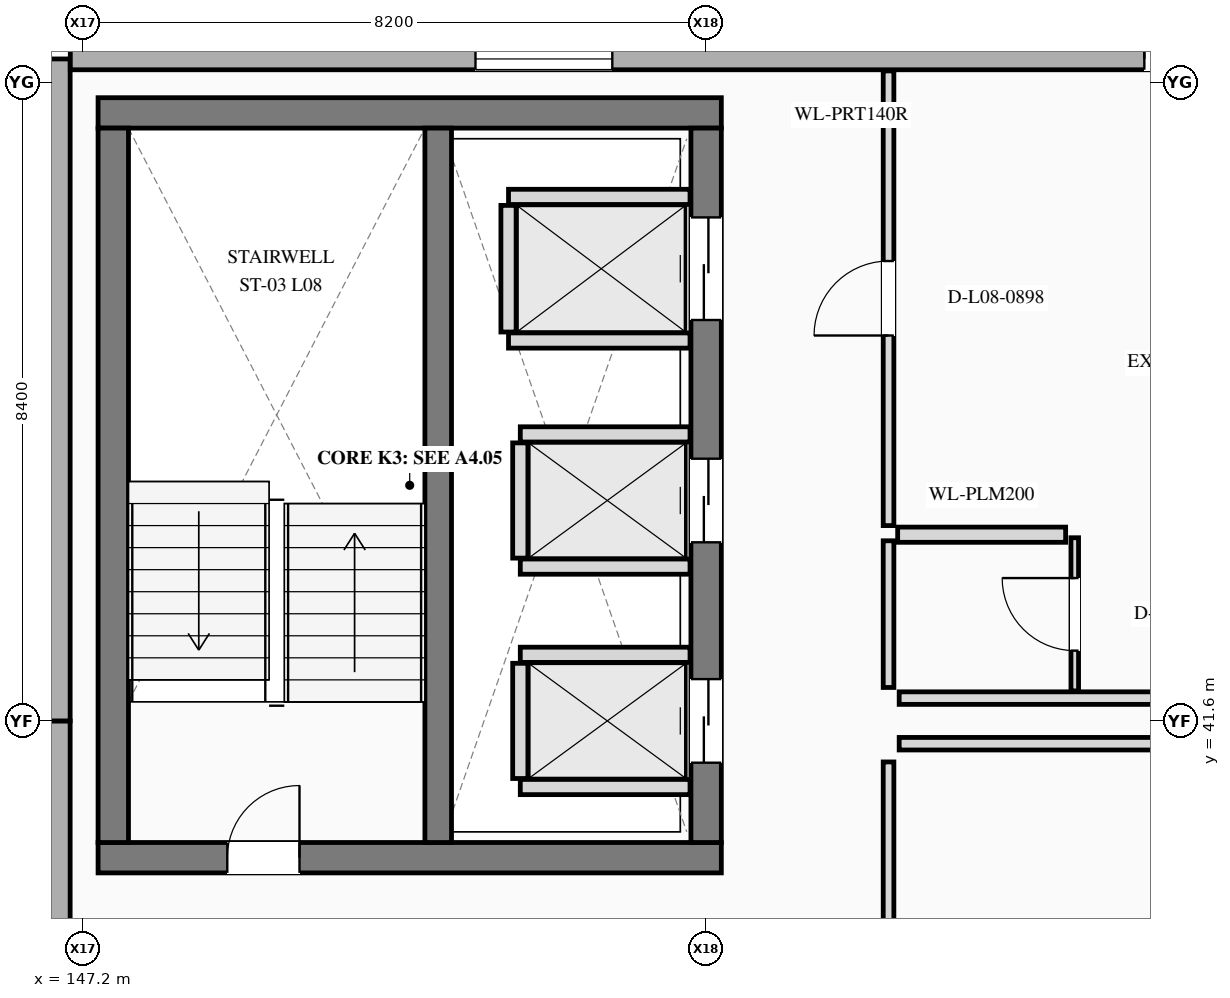
"""IFC4 building model, lengths in metres.
Left out: names, types, materials, properties, quantities, classifications, styles, units other than length and angle.
Written with IfcOpenShell. Run it as: python <this file> out.ifc"""

import sys

from ifc_helpers import new_model, si_unit, direction, frame, frame_2d, origin, place, context, subcontext, project, spatial, rectangle, extrude, element, fill, save


model = new_model("IFC4")
c1 = context("Model", 3, precision=1e-05, world=origin(), true_north=direction((0.0, 1.0)))
c2 = subcontext(c1, "Body", "Model", "MODEL_VIEW")
j1 = project(units=[si_unit("LENGTHUNIT", "METRE"), si_unit("PLANEANGLEUNIT", "RADIAN")], contexts=[c1])
p1 = place(None, origin())
s1 = spatial("IfcSite", under=j1, at=p1, CompositionType="ELEMENT")
p2 = place(p1, origin())
s2 = spatial("IfcBuilding", under=s1, at=p2, CompositionType="ELEMENT")
p3 = place(p2, frame((0.0, 0.0, 34.1)))
s3 = spatial("IfcBuildingStorey", under=s2, at=p3, CompositionType="ELEMENT", Elevation=34.1)
p4 = place(p3, frame((146.89, 33.2, 0.0), z_axis=(0.0, 0.0, 1.0), x_axis=(0.0, 1.0, 0.0)))
e1 = element("IfcWall", 1, at=p4, inside=s3, PredefinedType="STANDARD", context=c2, shape_type="SweptSolid", body=[
    extrude(rectangle(XDim=8.4, YDim=0.285, at=frame_2d((4.2, 0.0))), origin(), (0.0, 0.0, 1.0), 3.5),
])
p5 = place(p3, frame((146.89, 41.6, 0.0), z_axis=(0.0, 0.0, 1.0), x_axis=(0.0, 1.0, 0.0)))
e2 = element("IfcWall", 2, at=p5, inside=s3, PredefinedType="STANDARD", context=c2, shape_type="SweptSolid", body=[
    extrude(rectangle(XDim=8.71, YDim=0.285, at=frame_2d((4.355, 0.0))), origin(), (0.0, 0.0, 1.0), 3.5),
])
p6 = place(p3, frame((166.166, 50.31, 0.0), z_axis=(0.0, 0.0, 1.0), x_axis=(-1.0, 0.0, 0.0)))
e3 = element("IfcWall", 3, at=p6, inside=s3, PredefinedType="STANDARD", context=c2, shape_type="SweptSolid", body=[
    extrude(rectangle(XDim=19.131, YDim=0.285, at=frame_2d((9.565, 0.0))), origin(), (0.0, 0.0, 1.0), 3.5),
])
p7 = place(p6, frame((3.2, 0.0, 0.0)))
e4 = element("IfcOpeningElement", 4, at=p7, cuts=e3, PredefinedType="OPENING", context=c2, shape_type="SweptSolid", body=[
    extrude(rectangle(XDim=1.8, YDim=2.3, at=frame_2d((0.9, 1.15))), frame((0.0, 0.152, 0.0), z_axis=(0.0, -1.0, 0.0), x_axis=(1.0, 0.0, 0.0)), (0.0, 0.0, 1.0), 0.305),
])
p8 = place(p6, frame((12.0, 0.0, 0.88)))
e5 = element("IfcOpeningElement", 5, at=p8, cuts=e3, PredefinedType="OPENING", context=c2, shape_type="SweptSolid", body=[
    extrude(rectangle(XDim=1.8, YDim=1.8, at=frame_2d((0.9, 0.9))), frame((0.0, 0.152, 0.0), z_axis=(0.0, -1.0, 0.0), x_axis=(1.0, 0.0, 0.0)), (0.0, 0.0, 1.0), 0.305),
])
p9 = place(p3, frame((147.4, 39.8, 0.0), z_axis=(0.0, 0.0, 1.0), x_axis=(1.0, 0.0, 0.0)))
e6 = element("IfcWall", 6, at=p9, inside=s3, PredefinedType="SHEAR", context=c2, shape_type="SweptSolid", body=[
    extrude(rectangle(XDim=8.2, YDim=0.4, at=frame_2d((4.1, 0.0))), origin(), (0.0, 0.0, 1.0), 3.5),
])
p10 = place(p9, frame((1.7, 0.0, 0.0)))
e7 = element("IfcOpeningElement", 7, at=p10, cuts=e6, PredefinedType="OPENING", context=c2, shape_type="SweptSolid", body=[
    extrude(rectangle(XDim=0.95, YDim=2.2, at=frame_2d((0.475, 1.1))), frame((0.0, 0.21, 0.0), z_axis=(0.0, -1.0, 0.0), x_axis=(1.0, 0.0, 0.0)), (0.0, 0.0, 1.0), 0.42),
])
p11 = place(p3, frame((155.6, 49.6, 0.0), z_axis=(0.0, 0.0, 1.0), x_axis=(-1.0, 0.0, 0.0)))
e8 = element("IfcWall", 8, at=p11, inside=s3, PredefinedType="SHEAR", context=c2, shape_type="SweptSolid", body=[
    extrude(rectangle(XDim=8.2, YDim=0.4, at=frame_2d((4.1, 0.0))), origin(), (0.0, 0.0, 1.0), 3.5),
])
p12 = place(p3, frame((147.6, 49.4, 0.0), z_axis=(0.0, 0.0, 1.0), x_axis=(0.0, -1.0, 0.0)))
e9 = element("IfcWall", 9, at=p12, inside=s3, PredefinedType="SHEAR", context=c2, shape_type="SweptSolid", body=[
    extrude(rectangle(XDim=9.4, YDim=0.4, at=frame_2d((4.7, 0.0))), origin(), (0.0, 0.0, 1.0), 3.5),
])
p13 = place(p3, frame((155.4, 40.0, 0.0), z_axis=(0.0, 0.0, 1.0), x_axis=(0.0, 1.0, 0.0)))
e10 = element("IfcWall", 10, at=p13, inside=s3, PredefinedType="SHEAR", context=c2, shape_type="SweptSolid", body=[
    extrude(rectangle(XDim=9.4, YDim=0.4, at=frame_2d((4.7, 0.0))), origin(), (0.0, 0.0, 1.0), 3.5),
])
p14 = place(p13, frame((1.05, 0.0, 0.0)))
e11 = element("IfcOpeningElement", 11, at=p14, cuts=e10, PredefinedType="OPENING", context=c2, shape_type="SweptSolid", body=[
    extrude(rectangle(XDim=1.1, YDim=2.2, at=frame_2d((0.55, 1.1))), frame((0.0, 0.21, 0.0), z_axis=(0.0, -1.0, 0.0), x_axis=(1.0, 0.0, 0.0)), (0.0, 0.0, 1.0), 0.42),
])
p15 = place(p13, frame((3.95, 0.0, 0.0)))
e12 = element("IfcOpeningElement", 12, at=p15, cuts=e10, PredefinedType="OPENING", context=c2, shape_type="SweptSolid", body=[
    extrude(rectangle(XDim=1.1, YDim=2.2, at=frame_2d((0.55, 1.1))), frame((0.0, 0.21, 0.0), z_axis=(0.0, -1.0, 0.0), x_axis=(1.0, 0.0, 0.0)), (0.0, 0.0, 1.0), 0.42),
])
p16 = place(p13, frame((6.875, 0.0, 0.0)))
e13 = element("IfcOpeningElement", 13, at=p16, cuts=e10, PredefinedType="OPENING", context=c2, shape_type="SweptSolid", body=[
    extrude(rectangle(XDim=1.35, YDim=2.3, at=frame_2d((0.675, 1.15))), frame((0.0, 0.21, 0.0), z_axis=(0.0, -1.0, 0.0), x_axis=(1.0, 0.0, 0.0)), (0.0, 0.0, 1.0), 0.42),
])
p17 = place(p3, frame((151.875, 40.0, 0.0), z_axis=(0.0, 0.0, 1.0), x_axis=(0.0, 1.0, 0.0)))
e14 = element("IfcWall", 14, at=p17, inside=s3, PredefinedType="SHEAR", context=c2, shape_type="SweptSolid", body=[
    extrude(rectangle(XDim=9.4, YDim=0.35, at=frame_2d((4.7, 0.0))), origin(), (0.0, 0.0, 1.0), 3.5),
])
for number, where, z_axis, x_axis in (
    (15, (152.955, 40.73, 0.0), (0.0, 0.0, 1.0), (1.0, 0.0, 0.0)),
    (16, (152.955, 42.47, 0.0), (0.0, 0.0, 1.0), (1.0, 0.0, 0.0)),
):
    element("IfcWall", number, at=place(p3, frame(where, z_axis=z_axis, x_axis=x_axis)), inside=s3, PredefinedType="PLUMBINGWALL", context=c2, shape_type="SweptSolid", body=[
        extrude(rectangle(XDim=2.233, YDim=0.2, at=frame_2d((1.116, 0.0))), origin(), (0.0, 0.0, 1.0), 3.19),
    ])
p18 = place(p3, frame((152.955, 40.842, 0.0), z_axis=(0.0, 0.0, 1.0), x_axis=(0.0, 1.0, 0.0)))
e17 = element("IfcWall", 17, at=p18, inside=s3, PredefinedType="PLUMBINGWALL", context=c2, shape_type="SweptSolid", body=[
    extrude(rectangle(XDim=1.516, YDim=0.2, at=frame_2d((0.758, 0.0))), origin(), (0.0, 0.0, 1.0), 3.19),
])
for number, where, z_axis, x_axis in (
    (18, (152.955, 43.63, 0.0), (0.0, 0.0, 1.0), (1.0, 0.0, 0.0)),
    (19, (152.955, 45.37, 0.0), (0.0, 0.0, 1.0), (1.0, 0.0, 0.0)),
):
    element("IfcWall", number, at=place(p3, frame(where, z_axis=z_axis, x_axis=x_axis)), inside=s3, PredefinedType="PLUMBINGWALL", context=c2, shape_type="SweptSolid", body=[
        extrude(rectangle(XDim=2.233, YDim=0.2, at=frame_2d((1.116, 0.0))), origin(), (0.0, 0.0, 1.0), 3.19),
    ])
p19 = place(p3, frame((152.955, 43.742, 0.0), z_axis=(0.0, 0.0, 1.0), x_axis=(0.0, 1.0, 0.0)))
e20 = element("IfcWall", 20, at=p19, inside=s3, PredefinedType="PLUMBINGWALL", context=c2, shape_type="SweptSolid", body=[
    extrude(rectangle(XDim=1.516, YDim=0.2, at=frame_2d((0.758, 0.0))), origin(), (0.0, 0.0, 1.0), 3.19),
])
for number, where, z_axis, x_axis in (
    (21, (152.8, 46.605, 0.0), (0.0, 0.0, 1.0), (1.0, 0.0, 0.0)),
    (22, (152.8, 48.495, 0.0), (0.0, 0.0, 1.0), (1.0, 0.0, 0.0)),
):
    element("IfcWall", number, at=place(p3, frame(where, z_axis=z_axis, x_axis=x_axis)), inside=s3, PredefinedType="PLUMBINGWALL", context=c2, shape_type="SweptSolid", body=[
        extrude(rectangle(XDim=2.388, YDim=0.2, at=frame_2d((1.194, 0.0))), origin(), (0.0, 0.0, 1.0), 3.19),
    ])
p20 = place(p3, frame((152.8, 46.717, 0.0), z_axis=(0.0, 0.0, 1.0), x_axis=(0.0, 1.0, 0.0)))
e23 = element("IfcWall", 23, at=p20, inside=s3, PredefinedType="PLUMBINGWALL", context=c2, shape_type="SweptSolid", body=[
    extrude(rectangle(XDim=1.666, YDim=0.2, at=frame_2d((0.833, 0.0))), origin(), (0.0, 0.0, 1.0), 3.19),
])
p21 = place(p3, frame((157.8, 35.77, 0.0), z_axis=(0.0, 0.0, 1.0), x_axis=(0.0, 1.0, 0.0)))
e24 = element("IfcWall", 24, at=p21, inside=s3, PredefinedType="PARTITIONING", context=c2, shape_type="SweptSolid", body=[
    extrude(rectangle(XDim=5.29, YDim=0.14, at=frame_2d((2.645, 0.0))), origin(), (0.0, 0.0, 1.0), 3.19),
])
p22 = place(p21, frame((2.185, 0.0, 0.0)))
e25 = element("IfcOpeningElement", 25, at=p22, cuts=e24, PredefinedType="OPENING", context=c2, shape_type="SweptSolid", body=[
    extrude(rectangle(XDim=0.92, YDim=2.15, at=frame_2d((0.46, 1.075))), frame((0.0, 0.08, 0.0), z_axis=(0.0, -1.0, 0.0), x_axis=(1.0, 0.0, 0.0)), (0.0, 0.0, 1.0), 0.16),
])
p23 = place(p3, frame((157.94, 41.3, 0.0), z_axis=(0.0, 0.0, 1.0), x_axis=(1.0, 0.0, 0.0)))
e26 = element("IfcWall", 26, at=p23, inside=s3, PredefinedType="PARTITIONING", context=c2, shape_type="SweptSolid", body=[
    extrude(rectangle(XDim=8.213, YDim=0.165, at=frame_2d((4.106, 0.0))), origin(), (0.0, 0.0, 1.0), 2.58),
])
p24 = place(p3, frame((157.8, 42.04, 0.0), z_axis=(0.0, 0.0, 1.0), x_axis=(0.0, 1.0, 0.0)))
e27 = element("IfcWall", 27, at=p24, inside=s3, PredefinedType="PARTITIONING", context=c2, shape_type="SweptSolid", body=[
    extrude(rectangle(XDim=1.93, YDim=0.14, at=frame_2d((0.965, 0.0))), origin(), (0.0, 0.0, 1.0), 2.743),
])
p25 = place(p3, frame((157.8, 44.17, 0.0), z_axis=(0.0, 0.0, 1.0), x_axis=(0.0, 1.0, 0.0)))
e28 = element("IfcWall", 28, at=p25, inside=s3, PredefinedType="PARTITIONING", context=c2, shape_type="SweptSolid", body=[
    extrude(rectangle(XDim=5.983, YDim=0.14, at=frame_2d((2.991, 0.0))), origin(), (0.0, 0.0, 1.0), 2.743),
])
p26 = place(p25, frame((2.501, 0.0, 0.0)))
e29 = element("IfcOpeningElement", 29, at=p26, cuts=e28, PredefinedType="OPENING", context=c2, shape_type="SweptSolid", body=[
    extrude(rectangle(XDim=0.98, YDim=2.2, at=frame_2d((0.49, 1.1))), frame((0.0, 0.08, 0.0), z_axis=(0.0, -1.0, 0.0), x_axis=(1.0, 0.0, 0.0)), (0.0, 0.0, 1.0), 0.16),
])
p27 = place(p3, frame((157.94, 41.9, 0.0), z_axis=(0.0, 0.0, 1.0), x_axis=(1.0, 0.0, 0.0)))
e30 = element("IfcWall", 30, at=p27, inside=s3, PredefinedType="PARTITIONING", context=c2, shape_type="SweptSolid", body=[
    extrude(rectangle(XDim=8.213, YDim=0.165, at=frame_2d((4.106, 0.0))), origin(), (0.0, 0.0, 1.0), 2.58),
])
p28 = place(p3, frame((157.92, 44.05, 0.0), z_axis=(0.0, 0.0, 1.0), x_axis=(1.0, 0.0, 0.0)))
e31 = element("IfcWall", 31, at=p28, inside=s3, PredefinedType="PLUMBINGWALL", context=c2, shape_type="SweptSolid", body=[
    extrude(rectangle(XDim=2.21, YDim=0.2, at=frame_2d((1.105, 0.0))), origin(), (0.0, 0.0, 1.0), 3.19),
])
p29 = place(p3, frame((160.25, 41.994, 0.0), z_axis=(0.0, 0.0, 1.0), x_axis=(0.0, 1.0, 0.0)))
e32 = element("IfcWall", 32, at=p29, inside=s3, PredefinedType="PARTITIONING", context=c2, shape_type="SweptSolid", body=[
    extrude(rectangle(XDim=2.016, YDim=0.1, at=frame_2d((1.008, 0.0))), origin(), (0.0, 0.0, 1.0), 2.743),
])
p30 = place(p29, frame((0.53, 0.0, 0.0)))
e33 = element("IfcOpeningElement", 33, at=p30, cuts=e32, PredefinedType="OPENING", context=c2, shape_type="SweptSolid", body=[
    extrude(rectangle(XDim=0.955, YDim=2.14, at=frame_2d((0.478, 1.07))), frame((0.0, 0.06, 0.0), z_axis=(0.0, -1.0, 0.0), x_axis=(1.0, 0.0, 0.0)), (0.0, 0.0, 1.0), 0.12),
])
p31 = place(p7, frame((1.8, 0.0, 0.0), z_axis=(0.0, 0.0, 1.0), x_axis=(-1.0, 0.0, 0.0)))
e34 = element("IfcDoor", 34, at=p31, inside=s3, OperationType="DOUBLE_DOOR_SINGLE_SWING", PredefinedType="DOOR", context=c2, shape_type="SweptSolid", body=[
    extrude(rectangle(XDim=1.8, YDim=2.3, at=frame_2d((0.9, 1.15))), frame((0.0, 0.025, 0.0), z_axis=(0.0, -1.0, 0.0), x_axis=(1.0, 0.0, 0.0)), (0.0, 0.0, 1.0), 0.05),
])
fill(e4, e34)
p32 = place(p8, origin())
e35 = element("IfcWindow", 35, at=p32, inside=s3, PartitioningType="SINGLE_PANEL", PredefinedType="WINDOW", context=c2, shape_type="SweptSolid", body=[
    extrude(rectangle(XDim=1.8, YDim=1.8, at=frame_2d((0.9, 0.9))), frame((0.0, 0.03, 0.0), z_axis=(0.0, -1.0, 0.0), x_axis=(1.0, 0.0, 0.0)), (0.0, 0.0, 1.0), 0.06),
])
fill(e5, e35)
p33 = place(p10, origin())
e36 = element("IfcDoor", 36, at=p33, inside=s3, OperationType="SINGLE_SWING_RIGHT", PredefinedType="DOOR", context=c2, shape_type="SweptSolid", body=[
    extrude(rectangle(XDim=0.95, YDim=2.2, at=frame_2d((0.475, 1.1))), frame((0.0, 0.025, 0.0), z_axis=(0.0, -1.0, 0.0), x_axis=(1.0, 0.0, 0.0)), (0.0, 0.0, 1.0), 0.05),
])
fill(e7, e36)
p34 = place(p14, origin())
e37 = element("IfcDoor", 37, at=p34, inside=s3, OperationType="SLIDING_TO_LEFT", PredefinedType="DOOR", context=c2, shape_type="SweptSolid", body=[
    extrude(rectangle(XDim=1.1, YDim=2.2, at=frame_2d((0.55, 1.1))), frame((0.0, 0.025, 0.0), z_axis=(0.0, -1.0, 0.0), x_axis=(1.0, 0.0, 0.0)), (0.0, 0.0, 1.0), 0.05),
])
fill(e11, e37)
p35 = place(p15, origin())
e38 = element("IfcDoor", 38, at=p35, inside=s3, OperationType="SLIDING_TO_RIGHT", PredefinedType="DOOR", context=c2, shape_type="SweptSolid", body=[
    extrude(rectangle(XDim=1.1, YDim=2.2, at=frame_2d((0.55, 1.1))), frame((0.0, 0.025, 0.0), z_axis=(0.0, -1.0, 0.0), x_axis=(1.0, 0.0, 0.0)), (0.0, 0.0, 1.0), 0.05),
])
fill(e12, e38)
p36 = place(p16, origin())
e39 = element("IfcDoor", 39, at=p36, inside=s3, OperationType="SLIDING_TO_LEFT", PredefinedType="DOOR", context=c2, shape_type="SweptSolid", body=[
    extrude(rectangle(XDim=1.35, YDim=2.3, at=frame_2d((0.675, 1.15))), frame((0.0, 0.025, 0.0), z_axis=(0.0, -1.0, 0.0), x_axis=(1.0, 0.0, 0.0)), (0.0, 0.0, 1.0), 0.05),
])
fill(e13, e39)
p37 = place(p26, origin())
e40 = element("IfcDoor", 40, at=p37, inside=s3, OperationType="SINGLE_SWING_LEFT", PredefinedType="DOOR", context=c2, shape_type="SweptSolid", body=[
    extrude(rectangle(XDim=0.98, YDim=2.2, at=frame_2d((0.49, 1.1))), frame((0.0, 0.025, 0.0), z_axis=(0.0, -1.0, 0.0), x_axis=(1.0, 0.0, 0.0)), (0.0, 0.0, 1.0), 0.05),
])
fill(e29, e40)
p38 = place(p30, origin())
e41 = element("IfcDoor", 41, at=p38, inside=s3, OperationType="SINGLE_SWING_RIGHT", PredefinedType="DOOR", context=c2, shape_type="SweptSolid", body=[
    extrude(rectangle(XDim=0.955, YDim=2.14, at=frame_2d((0.478, 1.07))), frame((0.0, 0.025, 0.0), z_axis=(0.0, -1.0, 0.0), x_axis=(1.0, 0.0, 0.0)), (0.0, 0.0, 1.0), 0.05),
])
fill(e33, e41)
save(model, sys.argv[1])
